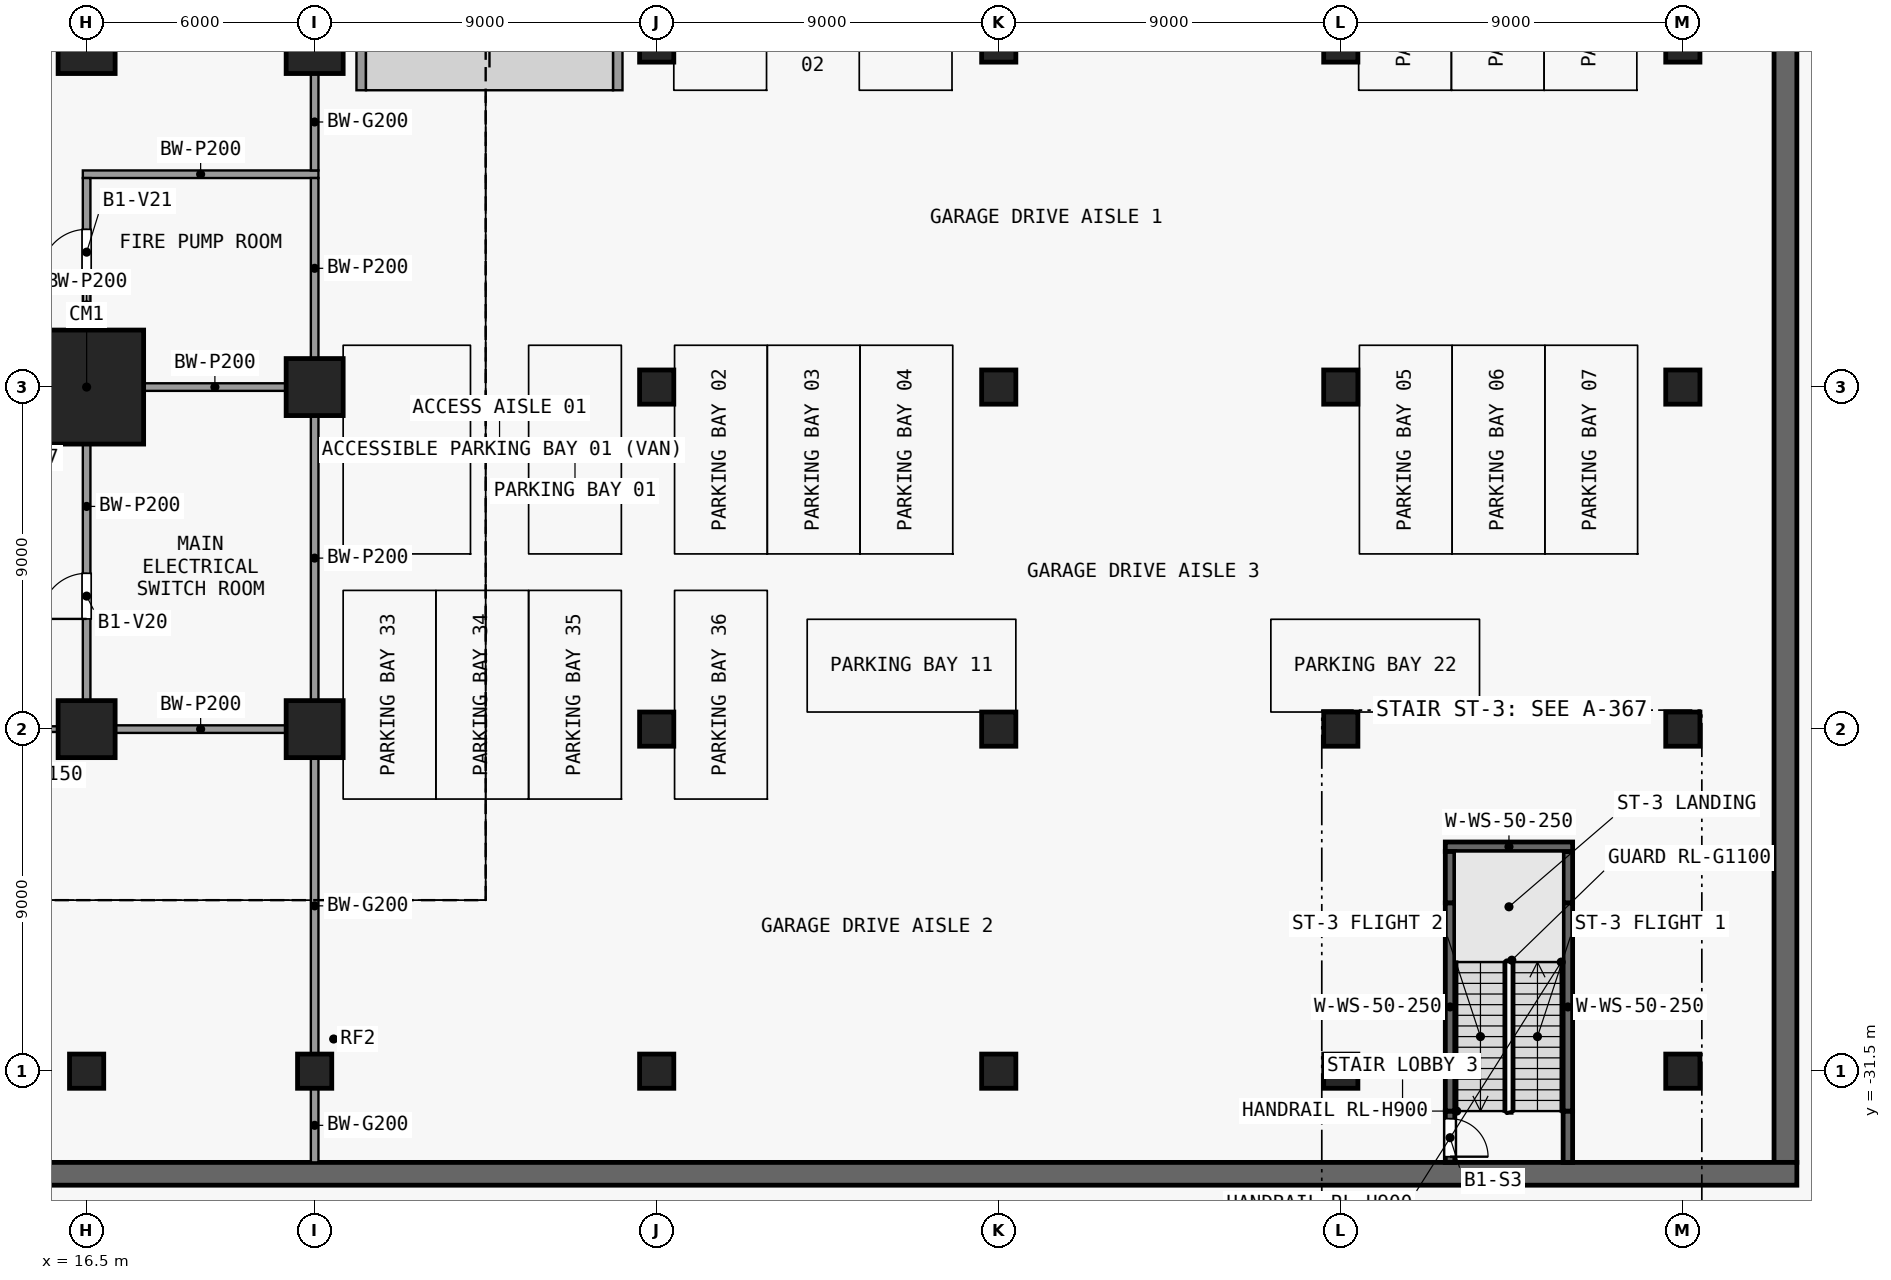
"""IFC4 building model, lengths in metres.
Left out: names, types, materials, properties, quantities, classifications, styles, units other than length and angle.
Written with IfcOpenShell. Run it as: python <this file> out.ifc"""

import sys

from ifc_helpers import new_model, si_unit, direction, frame, frame_2d, origin, origin_2d, place, context, subcontext, project, spatial, polyline, rectangle, outline, extrude, element, fill, save


model = new_model("IFC4")
c1 = context("Model", 3, precision=1e-05, world=origin(), true_north=direction((0.0, 1.0)))
c2 = subcontext(c1, "Body", "Model", "MODEL_VIEW")
j1 = project(units=[si_unit("LENGTHUNIT", "METRE"), si_unit("PLANEANGLEUNIT", "RADIAN")], contexts=[c1])
p1 = place(None, origin())
s1 = spatial("IfcSite", under=j1, at=p1, CompositionType="ELEMENT")
p2 = place(p1, origin())
s2 = spatial("IfcBuilding", under=s1, at=p2, CompositionType="ELEMENT")
p3 = place(p2, frame((0.0, 0.0, -5.0)))
s3 = spatial("IfcBuildingStorey", under=s2, at=p3, CompositionType="ELEMENT", Elevation=-5.0)
p4 = place(p3, frame((-34.5, -34.2, 0.0), z_axis=(0.0, 0.0, 1.0), x_axis=(1.0, 0.0, 0.0)))
e1 = element("IfcWall", 1, at=p4, inside=s3, PredefinedType="SOLIDWALL", context=c2, shape_type="SweptSolid", body=[
    extrude(rectangle(XDim=96.0, YDim=0.6, at=frame_2d((48.0, 0.0))), origin(), (0.0, 0.0, 1.0), 4.55),
])
p5 = place(p3, frame((61.2, -33.9, 0.0), z_axis=(0.0, 0.0, 1.0), x_axis=(0.0, 1.0, 0.0)))
e2 = element("IfcWall", 2, at=p5, inside=s3, PredefinedType="SOLIDWALL", context=c2, shape_type="SweptSolid", body=[
    extrude(rectangle(XDim=67.8, YDim=0.6, at=frame_2d((33.9, 0.0))), origin(), (0.0, 0.0, 1.0), 4.55),
])
p6 = place(p3, frame((16.5, -31.5, 0.0), z_axis=(0.0, 0.0, 1.0), x_axis=(1.0, 0.0, 0.0)))
e3 = element("IfcColumn", 3, at=p6, inside=s3, PredefinedType="COLUMN", context=c2, shape_type="SweptSolid", body=[
    extrude(rectangle(XDim=0.9, YDim=0.9, at=origin_2d()), origin(), (0.0, 0.0, 1.0), 5.0),
])
p7 = place(p3, frame((16.5, -22.5, 0.0), z_axis=(0.0, 0.0, 1.0), x_axis=(1.0, 0.0, 0.0)))
e4 = element("IfcColumn", 4, at=p7, inside=s3, PredefinedType="COLUMN", context=c2, shape_type="SweptSolid", body=[
    extrude(rectangle(XDim=1.5, YDim=1.5, at=origin_2d()), origin(), (0.0, 0.0, 1.0), 5.0),
])
p8 = place(p3, frame((16.5, -13.5, 0.0), z_axis=(0.0, 0.0, 1.0), x_axis=(1.0, 0.0, 0.0)))
e5 = element("IfcColumn", 5, at=p8, inside=s3, PredefinedType="COLUMN", context=c2, shape_type="SweptSolid", body=[
    extrude(rectangle(XDim=3.0, YDim=3.0, at=origin_2d()), origin(), (0.0, 0.0, 1.0), 5.0),
])
p9 = place(p3, frame((16.5, -4.5, 0.0), z_axis=(0.0, 0.0, 1.0), x_axis=(1.0, 0.0, 0.0)))
e6 = element("IfcColumn", 6, at=p9, inside=s3, PredefinedType="COLUMN", context=c2, shape_type="SweptSolid", body=[
    extrude(rectangle(XDim=1.5, YDim=1.5, at=origin_2d()), origin(), (0.0, 0.0, 1.0), 5.0),
])
p10 = place(p3, frame((22.5, -31.5, 0.0), z_axis=(0.0, 0.0, 1.0), x_axis=(1.0, 0.0, 0.0)))
e7 = element("IfcColumn", 7, at=p10, inside=s3, PredefinedType="COLUMN", context=c2, shape_type="SweptSolid", body=[
    extrude(rectangle(XDim=0.9, YDim=0.9, at=origin_2d()), origin(), (0.0, 0.0, 1.0), 5.0),
])
for number, where, z_axis, x_axis in (
    (8, (22.5, -22.5, 0.0), (0.0, 0.0, 1.0), (1.0, 0.0, 0.0)),
    (9, (22.5, -13.5, 0.0), (0.0, 0.0, 1.0), (1.0, 0.0, 0.0)),
    (10, (22.5, -4.5, 0.0), (0.0, 0.0, 1.0), (1.0, 0.0, 0.0)),
):
    element("IfcColumn", number, at=place(p3, frame(where, z_axis=z_axis, x_axis=x_axis)), inside=s3, PredefinedType="COLUMN", context=c2, shape_type="SweptSolid", body=[
        extrude(rectangle(XDim=1.5, YDim=1.5, at=origin_2d()), origin(), (0.0, 0.0, 1.0), 5.0),
    ])
for number, where, z_axis, x_axis in (
    (11, (31.5, -31.5, 0.0), (0.0, 0.0, 1.0), (1.0, 0.0, 0.0)),
    (12, (31.5, -22.5, 0.0), (0.0, 0.0, 1.0), (1.0, 0.0, 0.0)),
    (13, (31.5, -13.5, 0.0), (0.0, 0.0, 1.0), (1.0, 0.0, 0.0)),
    (14, (31.5, -4.5, 0.0), (0.0, 0.0, 1.0), (1.0, 0.0, 0.0)),
    (15, (40.5, -31.5, 0.0), (0.0, 0.0, 1.0), (1.0, 0.0, 0.0)),
    (16, (40.5, -22.5, 0.0), (0.0, 0.0, 1.0), (1.0, 0.0, 0.0)),
    (17, (40.5, -13.5, 0.0), (0.0, 0.0, 1.0), (1.0, 0.0, 0.0)),
    (18, (40.5, -4.5, 0.0), (0.0, 0.0, 1.0), (1.0, 0.0, 0.0)),
    (19, (49.5, -31.5, 0.0), (0.0, 0.0, 1.0), (1.0, 0.0, 0.0)),
    (20, (49.5, -22.5, 0.0), (0.0, 0.0, 1.0), (1.0, 0.0, 0.0)),
    (21, (49.5, -13.5, 0.0), (0.0, 0.0, 1.0), (1.0, 0.0, 0.0)),
    (22, (49.5, -4.5, 0.0), (0.0, 0.0, 1.0), (1.0, 0.0, 0.0)),
    (23, (58.5, -31.5, 0.0), (0.0, 0.0, 1.0), (1.0, 0.0, 0.0)),
    (24, (58.5, -22.5, 0.0), (0.0, 0.0, 1.0), (1.0, 0.0, 0.0)),
    (25, (58.5, -13.5, 0.0), (0.0, 0.0, 1.0), (1.0, 0.0, 0.0)),
    (26, (58.5, -4.5, 0.0), (0.0, 0.0, 1.0), (1.0, 0.0, 0.0)),
):
    element("IfcColumn", number, at=place(p3, frame(where, z_axis=z_axis, x_axis=x_axis)), inside=s3, PredefinedType="COLUMN", context=c2, shape_type="SweptSolid", body=[
        extrude(rectangle(XDim=0.9, YDim=0.9, at=origin_2d()), origin(), (0.0, 0.0, 1.0), 5.0),
    ])
for number, where, z_axis, x_axis in (
    (27, (23.725, 31.1, 0.0), (0.0, 0.0, 1.0), (0.0, -1.0, 0.0)),
    (28, (30.475, 31.1, 0.0), (0.0, 0.0, 1.0), (0.0, -1.0, 0.0)),
):
    element("IfcWall", number, at=place(p3, frame(where, z_axis=z_axis, x_axis=x_axis)), inside=s3, PredefinedType="SOLIDWALL", context=c2, shape_type="SweptSolid", body=[
        extrude(outline(polyline([(0.0, 0.0), (36.79, 0.0), (36.79, 1.1), (33.79, 1.35), (3.0, 5.85), (0.0, 6.1), (0.0, 0.0)])), frame((0.0, 0.125, 0.0), z_axis=(0.0, -1.0, 0.0), x_axis=(1.0, 0.0, 0.0)), (0.0, 0.0, 1.0), 0.25),
    ])
p11 = place(p3, frame((13.5, -22.5, 0.0), z_axis=(0.0, 0.0, 1.0), x_axis=(1.0, 0.0, 0.0)))
e29 = element("IfcWall", 29, at=p11, inside=s3, PredefinedType="PARTITIONING", context=c2, shape_type="SweptSolid", body=[
    extrude(rectangle(XDim=2.25, YDim=0.15, at=frame_2d((1.125, 0.0))), origin(), (0.0, 0.0, 1.0), 4.55),
])
p12 = place(p3, frame((17.25, -22.5, 0.0), z_axis=(0.0, 0.0, 1.0), x_axis=(1.0, 0.0, 0.0)))
e30 = element("IfcWall", 30, at=p12, inside=s3, PredefinedType="SOLIDWALL", context=c2, shape_type="SweptSolid", body=[
    extrude(rectangle(XDim=4.5, YDim=0.2, at=frame_2d((2.25, 0.0))), origin(), (0.0, 0.0, 1.0), 4.55),
])
p13 = place(p3, frame((18.0, -13.5, 0.0), z_axis=(0.0, 0.0, 1.0), x_axis=(1.0, 0.0, 0.0)))
e31 = element("IfcWall", 31, at=p13, inside=s3, PredefinedType="SOLIDWALL", context=c2, shape_type="SweptSolid", body=[
    extrude(rectangle(XDim=3.75, YDim=0.2, at=frame_2d((1.875, 0.0))), origin(), (0.0, 0.0, 1.0), 4.55),
])
p14 = place(p3, frame((16.4, -7.9, 0.0), z_axis=(0.0, 0.0, 1.0), x_axis=(1.0, 0.0, 0.0)))
e32 = element("IfcWall", 32, at=p14, inside=s3, PredefinedType="SOLIDWALL", context=c2, shape_type="SweptSolid", body=[
    extrude(rectangle(XDim=6.2, YDim=0.2, at=frame_2d((3.1, 0.0))), origin(), (0.0, 0.0, 1.0), 4.55),
])
p15 = place(p3, frame((16.5, -21.75, 0.0), z_axis=(0.0, 0.0, 1.0), x_axis=(0.0, 1.0, 0.0)))
e33 = element("IfcWall", 33, at=p15, inside=s3, PredefinedType="SOLIDWALL", context=c2, shape_type="SweptSolid", body=[
    extrude(rectangle(XDim=6.75, YDim=0.2, at=frame_2d((3.375, 0.0))), origin(), (0.0, 0.0, 1.0), 4.55),
])
p16 = place(p15, frame((2.15, 0.0, 0.0)))
e34 = element("IfcOpeningElement", 34, at=p16, cuts=e33, PredefinedType="OPENING", context=c2, shape_type="SweptSolid", body=[
    extrude(rectangle(XDim=1.2, YDim=2.1, at=frame_2d((0.6, 1.05))), frame((0.0, 0.11, 0.0), z_axis=(0.0, -1.0, 0.0), x_axis=(1.0, 0.0, 0.0)), (0.0, 0.0, 1.0), 0.22),
])
p17 = place(p3, frame((16.5, -12.0, 0.0), z_axis=(0.0, 0.0, 1.0), x_axis=(0.0, 1.0, 0.0)))
e35 = element("IfcWall", 35, at=p17, inside=s3, PredefinedType="SOLIDWALL", context=c2, shape_type="SweptSolid", body=[
    extrude(rectangle(XDim=4.0, YDim=0.2, at=frame_2d((2.0, 0.0))), origin(), (0.0, 0.0, 1.0), 4.55),
])
p18 = place(p17, frame((1.45, 0.0, 0.0)))
e36 = element("IfcOpeningElement", 36, at=p18, cuts=e35, PredefinedType="OPENING", context=c2, shape_type="SweptSolid", body=[
    extrude(rectangle(XDim=1.2, YDim=2.1, at=frame_2d((0.6, 1.05))), frame((0.0, 0.11, 0.0), z_axis=(0.0, -1.0, 0.0), x_axis=(1.0, 0.0, 0.0)), (0.0, 0.0, 1.0), 0.22),
])
p19 = place(p3, frame((22.5, -33.9, 0.0), z_axis=(0.0, 0.0, 1.0), x_axis=(0.0, 1.0, 0.0)))
e37 = element("IfcWall", 37, at=p19, inside=s3, PredefinedType="SOLIDWALL", context=c2, shape_type="SweptSolid", body=[
    extrude(rectangle(XDim=1.95, YDim=0.2, at=frame_2d((0.975, 0.0))), origin(), (0.0, 0.0, 1.0), 4.55),
])
p20 = place(p3, frame((22.5, -31.05, 0.0), z_axis=(0.0, 0.0, 1.0), x_axis=(0.0, 1.0, 0.0)))
e38 = element("IfcWall", 38, at=p20, inside=s3, PredefinedType="SOLIDWALL", context=c2, shape_type="SweptSolid", body=[
    extrude(rectangle(XDim=7.8, YDim=0.2, at=frame_2d((3.9, 0.0))), origin(), (0.0, 0.0, 1.0), 4.55),
])
p21 = place(p3, frame((22.5, -21.75, 0.0), z_axis=(0.0, 0.0, 1.0), x_axis=(0.0, 1.0, 0.0)))
e39 = element("IfcWall", 39, at=p21, inside=s3, PredefinedType="SOLIDWALL", context=c2, shape_type="SweptSolid", body=[
    extrude(rectangle(XDim=7.5, YDim=0.2, at=frame_2d((3.75, 0.0))), origin(), (0.0, 0.0, 1.0), 4.55),
])
p22 = place(p3, frame((22.5, -12.75, 0.0), z_axis=(0.0, 0.0, 1.0), x_axis=(0.0, 1.0, 0.0)))
e40 = element("IfcWall", 40, at=p22, inside=s3, PredefinedType="SOLIDWALL", context=c2, shape_type="SweptSolid", body=[
    extrude(rectangle(XDim=4.75, YDim=0.2, at=frame_2d((2.375, 0.0))), origin(), (0.0, 0.0, 1.0), 4.55),
])
p23 = place(p3, frame((22.5, -7.8, 0.0), z_axis=(0.0, 0.0, 1.0), x_axis=(0.0, 1.0, 0.0)))
e41 = element("IfcWall", 41, at=p23, inside=s3, PredefinedType="SOLIDWALL", context=c2, shape_type="SweptSolid", body=[
    extrude(rectangle(XDim=2.55, YDim=0.2, at=frame_2d((1.275, 0.0))), origin(), (0.0, 0.0, 1.0), 4.55),
])
p24 = place(p3, frame((52.375, -32.55, 0.0), z_axis=(0.0, 0.0, 1.0), x_axis=(0.0, -1.0, 0.0)))
e42 = element("IfcWall", 42, at=p24, inside=s3, PredefinedType="SHEAR", context=c2, shape_type="SweptSolid", body=[
    extrude(rectangle(XDim=1.35, YDim=0.25, at=frame_2d((0.675, 0.0))), origin(), (0.0, 0.0, 1.0), 4.55),
])
p25 = place(p24, frame((0.2, 0.0, 0.0)))
e43 = element("IfcOpeningElement", 43, at=p25, cuts=e42, PredefinedType="OPENING", context=c2, shape_type="SweptSolid", body=[
    extrude(rectangle(XDim=1.0, YDim=2.1, at=frame_2d((0.5, 1.05))), frame((0.0, 0.135, 0.0), z_axis=(0.0, -1.0, 0.0), x_axis=(1.0, 0.0, 0.0)), (0.0, 0.0, 1.0), 0.27),
])
p26 = place(p3, frame((52.375, -32.55, 0.0), z_axis=(0.0, 0.0, 1.0), x_axis=(0.0, 1.0, 0.0)))
e44 = element("IfcWall", 44, at=p26, inside=s3, PredefinedType="SHEAR", context=c2, shape_type="SweptSolid", body=[
    extrude(rectangle(XDim=5.48, YDim=0.25, at=frame_2d((2.74, 0.0))), origin(), (0.0, 0.0, 1.0), 4.55),
])
p27 = place(p3, frame((52.375, -27.07, 0.0), z_axis=(0.0, 0.0, 1.0), x_axis=(0.0, 1.0, 0.0)))
e45 = element("IfcWall", 45, at=p27, inside=s3, PredefinedType="SHEAR", context=c2, shape_type="SweptSolid", body=[
    extrude(rectangle(XDim=1.35, YDim=0.25, at=frame_2d((0.675, 0.0))), origin(), (0.0, 0.0, 1.0), 4.55),
])
p28 = place(p3, frame((55.475, -33.9, 0.0), z_axis=(0.0, 0.0, 1.0), x_axis=(0.0, 1.0, 0.0)))
e46 = element("IfcWall", 46, at=p28, inside=s3, PredefinedType="SHEAR", context=c2, shape_type="SweptSolid", body=[
    extrude(rectangle(XDim=1.35, YDim=0.25, at=frame_2d((0.675, 0.0))), origin(), (0.0, 0.0, 1.0), 4.55),
])
p29 = place(p3, frame((55.475, -32.55, 0.0), z_axis=(0.0, 0.0, 1.0), x_axis=(0.0, 1.0, 0.0)))
e47 = element("IfcWall", 47, at=p29, inside=s3, PredefinedType="SHEAR", context=c2, shape_type="SweptSolid", body=[
    extrude(rectangle(XDim=5.48, YDim=0.25, at=frame_2d((2.74, 0.0))), origin(), (0.0, 0.0, 1.0), 4.55),
])
p30 = place(p3, frame((55.475, -27.07, 0.0), z_axis=(0.0, 0.0, 1.0), x_axis=(0.0, 1.0, 0.0)))
e48 = element("IfcWall", 48, at=p30, inside=s3, PredefinedType="SHEAR", context=c2, shape_type="SweptSolid", body=[
    extrude(rectangle(XDim=1.35, YDim=0.25, at=frame_2d((0.675, 0.0))), origin(), (0.0, 0.0, 1.0), 4.55),
])
p31 = place(p3, frame((52.25, -25.595, 0.0), z_axis=(0.0, 0.0, 1.0), x_axis=(1.0, 0.0, 0.0)))
e49 = element("IfcWall", 49, at=p31, inside=s3, PredefinedType="SHEAR", context=c2, shape_type="SweptSolid", body=[
    extrude(rectangle(XDim=3.35, YDim=0.25, at=frame_2d((1.675, 0.0))), origin(), (0.0, 0.0, 1.0), 4.55),
])
p32 = place(p16, origin())
e50 = element("IfcDoor", 50, at=p32, inside=s3, OperationType="SINGLE_SWING_LEFT", PredefinedType="DOOR", context=c2, shape_type="SweptSolid", body=[
    extrude(rectangle(XDim=1.2, YDim=2.1, at=frame_2d((0.6, 1.05))), frame((0.0, 0.025, 0.0), z_axis=(0.0, -1.0, 0.0), x_axis=(1.0, 0.0, 0.0)), (0.0, 0.0, 1.0), 0.05),
])
fill(e34, e50)
p33 = place(p18, origin())
e51 = element("IfcDoor", 51, at=p33, inside=s3, OperationType="SINGLE_SWING_LEFT", PredefinedType="DOOR", context=c2, shape_type="SweptSolid", body=[
    extrude(rectangle(XDim=1.2, YDim=2.1, at=frame_2d((0.6, 1.05))), frame((0.0, 0.025, 0.0), z_axis=(0.0, -1.0, 0.0), x_axis=(1.0, 0.0, 0.0)), (0.0, 0.0, 1.0), 0.05),
])
fill(e36, e51)
p34 = place(p25, origin())
e52 = element("IfcDoor", 52, at=p34, inside=s3, OperationType="SINGLE_SWING_RIGHT", PredefinedType="DOOR", context=c2, shape_type="SweptSolid", body=[
    extrude(rectangle(XDim=1.0, YDim=2.1, at=frame_2d((0.5, 1.05))), frame((0.0, 0.025, 0.0), z_axis=(0.0, -1.0, 0.0), x_axis=(1.0, 0.0, 0.0)), (0.0, 0.0, 1.0), 0.05),
])
fill(e43, e52)
save(model, sys.argv[1])
